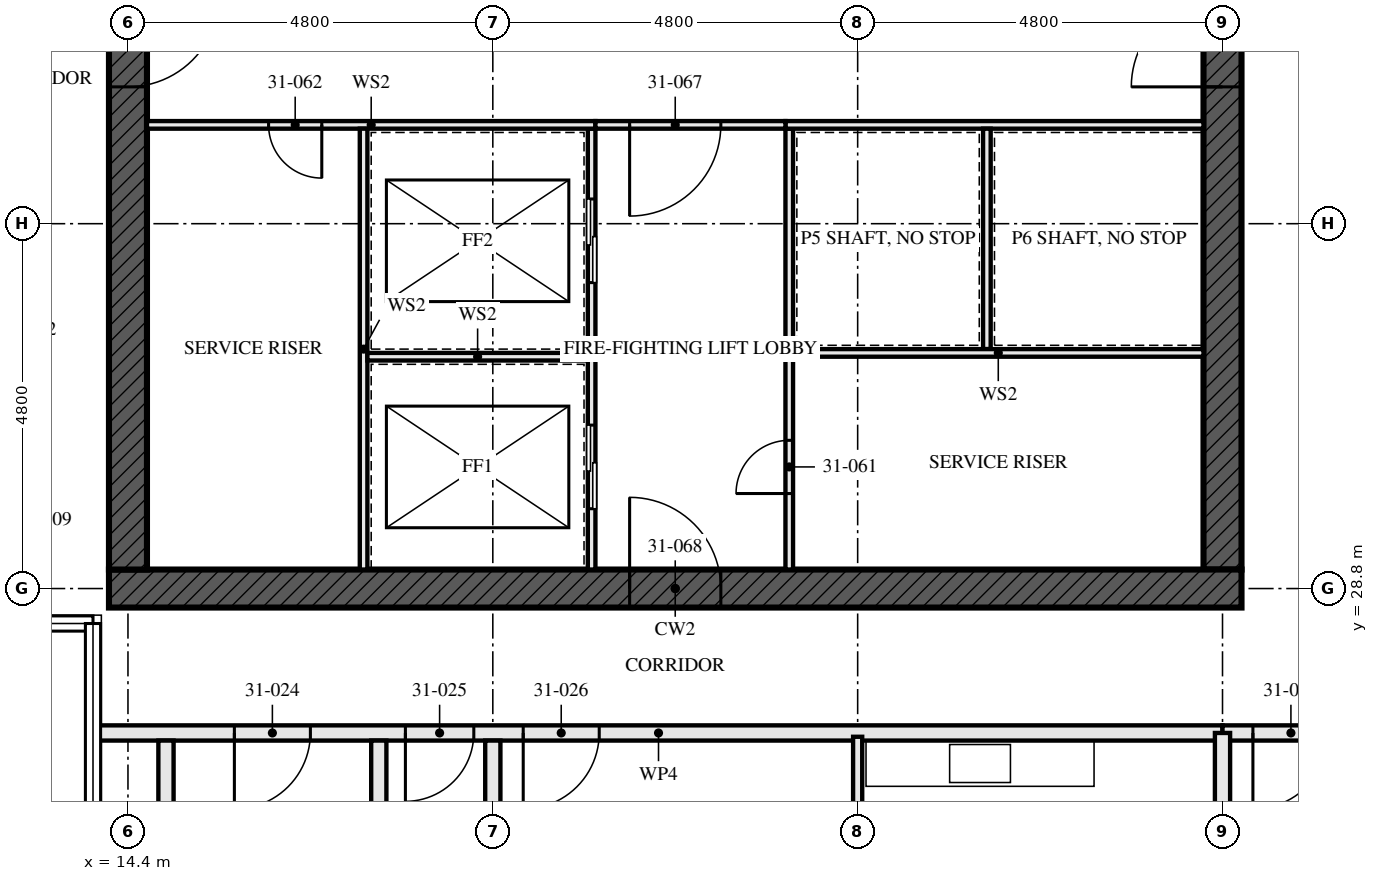
"""IFC4 building model, lengths in metres.
Left out: names, types, materials, properties, quantities, classifications, styles, units other than length and angle.
Written with IfcOpenShell. Run it as: python <this file> out.ifc"""

import sys

from ifc_helpers import new_model, si_unit, direction, frame, frame_2d, origin, place, context, subcontext, project, spatial, rectangle, extrude, element, fill, save


model = new_model("IFC4")
c1 = context("Model", 3, precision=1e-05, world=origin(), true_north=direction((0.0, 1.0)))
c2 = subcontext(c1, "Body", "Model", "MODEL_VIEW")
j1 = project(units=[si_unit("LENGTHUNIT", "METRE"), si_unit("PLANEANGLEUNIT", "RADIAN")], contexts=[c1])
p1 = place(None, origin())
s1 = spatial("IfcSite", under=j1, at=p1, CompositionType="ELEMENT")
p2 = place(p1, origin())
s2 = spatial("IfcBuilding", under=s1, at=p2, CompositionType="ELEMENT")
p3 = place(p2, frame((0.0, 0.0, 115.5)))
s3 = spatial("IfcBuildingStorey", under=s2, at=p3, CompositionType="ELEMENT", Elevation=115.5)
p4 = place(p3, frame((14.15, 28.8, -0.17), z_axis=(0.0, 0.0, 1.0), x_axis=(1.0, 0.0, 0.0)))
e1 = element("IfcWall", 1, at=p4, inside=s3, PredefinedType="SHEAR", context=c2, shape_type="SweptSolid", body=[
    extrude(rectangle(XDim=14.9, YDim=0.5, at=frame_2d((7.45, 0.0))), origin(), (0.0, 0.0, 1.0), 3.5),
])
p5 = place(p4, frame((6.85, 0.0, 0.17)))
e2 = element("IfcOpeningElement", 2, at=p5, cuts=e1, PredefinedType="OPENING", context=c2, shape_type="SweptSolid", body=[
    extrude(rectangle(XDim=1.2, YDim=2.1, at=frame_2d((0.6, 1.05))), frame((0.0, 0.26, 0.0), z_axis=(0.0, -1.0, 0.0), x_axis=(1.0, 0.0, 0.0)), (0.0, 0.0, 1.0), 0.521),
])
p6 = place(p3, frame((14.4, 42.95, -0.17), z_axis=(0.0, 0.0, 1.0), x_axis=(0.0, -1.0, 0.0)))
e3 = element("IfcWall", 3, at=p6, inside=s3, PredefinedType="SHEAR", context=c2, shape_type="SweptSolid", body=[
    extrude(rectangle(XDim=13.9, YDim=0.5, at=frame_2d((6.95, 0.0))), origin(), (0.0, 0.0, 1.0), 3.5),
])
p7 = place(p6, frame((6.35, 0.0, 0.17)))
e4 = element("IfcOpeningElement", 4, at=p7, cuts=e3, PredefinedType="OPENING", context=c2, shape_type="SweptSolid", body=[
    extrude(rectangle(XDim=1.2, YDim=2.1, at=frame_2d((0.6, 1.05))), frame((0.0, 0.26, 0.0), z_axis=(0.0, -1.0, 0.0), x_axis=(1.0, 0.0, 0.0)), (0.0, 0.0, 1.0), 0.521),
])
p8 = place(p3, frame((28.8, 29.05, -0.17), z_axis=(0.0, 0.0, 1.0), x_axis=(0.0, 1.0, 0.0)))
e5 = element("IfcWall", 5, at=p8, inside=s3, PredefinedType="SHEAR", context=c2, shape_type="SweptSolid", body=[
    extrude(rectangle(XDim=13.9, YDim=0.5, at=frame_2d((6.95, 0.0))), origin(), (0.0, 0.0, 1.0), 3.5),
])
p9 = place(p8, frame((6.35, 0.0, 0.17)))
e6 = element("IfcOpeningElement", 6, at=p9, cuts=e5, PredefinedType="OPENING", context=c2, shape_type="SweptSolid", body=[
    extrude(rectangle(XDim=1.2, YDim=2.1, at=frame_2d((0.6, 1.05))), frame((0.0, 0.26, 0.0), z_axis=(0.0, -1.0, 0.0), x_axis=(1.0, 0.0, 0.0)), (0.0, 0.0, 1.0), 0.521),
])
for number, where, z_axis, x_axis in (
    (7, (14.9, 22.1, 0.0), (0.0, 0.0, 1.0), (0.0, 1.0, 0.0)),
    (8, (17.7, 22.1, 0.0), (0.0, 0.0, 1.0), (0.0, 1.0, 0.0)),
):
    element("IfcWall", number, at=place(p3, frame(where, z_axis=z_axis, x_axis=x_axis)), inside=s3, PredefinedType="SOLIDWALL", context=c2, shape_type="SweptSolid", body=[
        extrude(rectangle(XDim=4.7, YDim=0.2, at=frame_2d((2.35, 0.0))), origin(), (0.0, 0.0, 1.0), 2.99),
    ])
p10 = place(p3, frame((19.2, 19.52, 0.0), z_axis=(0.0, 0.0, 1.0), x_axis=(0.0, 1.0, 0.0)))
e9 = element("IfcWall", 9, at=p10, inside=s3, PredefinedType="PARTITIONING", context=c2, shape_type="SweptSolid", body=[
    extrude(rectangle(XDim=7.28, YDim=0.2, at=frame_2d((3.64, 0.0))), origin(), (0.0, 0.0, 1.0), 2.55),
])
p11 = place(p3, frame((24.0, 18.6, 0.0), z_axis=(0.0, 0.0, 1.0), x_axis=(0.0, 1.0, 0.0)))
e10 = element("IfcWall", 10, at=p11, inside=s3, PredefinedType="PARTITIONING", context=c2, shape_type="SweptSolid", body=[
    extrude(rectangle(XDim=8.25, YDim=0.12, at=frame_2d((4.125, 0.0))), origin(), (0.0, 0.0, 1.0), 2.55),
])
p12 = place(p11, frame((5.15, 0.0, 0.0)))
e11 = element("IfcOpeningElement", 11, at=p12, cuts=e10, PredefinedType="OPENING", context=c2, shape_type="SweptSolid", body=[
    extrude(rectangle(XDim=0.9, YDim=2.1, at=frame_2d((0.45, 1.05))), frame((0.0, 0.071, 0.0), z_axis=(0.0, -1.0, 0.0), x_axis=(1.0, 0.0, 0.0)), (0.0, 0.0, 1.0), 0.141),
])
p13 = place(p3, frame((13.96, 26.9, 0.0), z_axis=(0.0, 0.0, 1.0), x_axis=(1.0, 0.0, 0.0)))
e12 = element("IfcWall", 12, at=p13, inside=s3, PredefinedType="PARTITIONING", context=c2, shape_type="SweptSolid", body=[
    extrude(rectangle(XDim=14.84, YDim=0.2, at=frame_2d((7.42, 0.0))), origin(), (0.0, 0.0, 1.0), 2.32),
])
p14 = place(p13, frame((1.84, 0.0, 0.0)))
e13 = element("IfcOpeningElement", 13, at=p14, cuts=e12, PredefinedType="OPENING", context=c2, shape_type="SweptSolid", body=[
    extrude(rectangle(XDim=1.0, YDim=2.1, at=frame_2d((0.5, 1.05))), frame((0.0, 0.111, 0.0), z_axis=(0.0, -1.0, 0.0), x_axis=(1.0, 0.0, 0.0)), (0.0, 0.0, 1.0), 0.221),
])
p15 = place(p13, frame((4.09, 0.0, 0.0)))
e14 = element("IfcOpeningElement", 14, at=p15, cuts=e12, PredefinedType="OPENING", context=c2, shape_type="SweptSolid", body=[
    extrude(rectangle(XDim=0.9, YDim=2.1, at=frame_2d((0.45, 1.05))), frame((0.0, 0.111, 0.0), z_axis=(0.0, -1.0, 0.0), x_axis=(1.0, 0.0, 0.0)), (0.0, 0.0, 1.0), 0.221),
])
p16 = place(p13, frame((5.64, 0.0, 0.0)))
e15 = element("IfcOpeningElement", 15, at=p16, cuts=e12, PredefinedType="OPENING", context=c2, shape_type="SweptSolid", body=[
    extrude(rectangle(XDim=1.0, YDim=2.1, at=frame_2d((0.5, 1.05))), frame((0.0, 0.111, 0.0), z_axis=(0.0, -1.0, 0.0), x_axis=(1.0, 0.0, 0.0)), (0.0, 0.0, 1.0), 0.221),
])
p17 = place(p3, frame((28.8, 26.9, 0.0), z_axis=(0.0, 0.0, 1.0), x_axis=(1.0, 0.0, 0.0)))
e16 = element("IfcWall", 16, at=p17, inside=s3, PredefinedType="PARTITIONING", context=c2, shape_type="SweptSolid", body=[
    extrude(rectangle(XDim=9.6, YDim=0.2, at=frame_2d((4.8, 0.0))), origin(), (0.0, 0.0, 1.0), 3.33),
])
p18 = place(p17, frame((0.4, 0.0, 0.0)))
e17 = element("IfcOpeningElement", 17, at=p18, cuts=e16, PredefinedType="OPENING", context=c2, shape_type="SweptSolid", body=[
    extrude(rectangle(XDim=1.0, YDim=2.1, at=frame_2d((0.5, 1.05))), frame((0.0, 0.111, 0.0), z_axis=(0.0, -1.0, 0.0), x_axis=(1.0, 0.0, 0.0)), (0.0, 0.0, 1.0), 0.221),
])
p19 = place(p17, frame((5.2, 0.0, 0.0)))
e18 = element("IfcOpeningElement", 18, at=p19, cuts=e16, PredefinedType="OPENING", context=c2, shape_type="SweptSolid", body=[
    extrude(rectangle(XDim=1.0, YDim=2.1, at=frame_2d((0.5, 1.05))), frame((0.0, 0.111, 0.0), z_axis=(0.0, -1.0, 0.0), x_axis=(1.0, 0.0, 0.0)), (0.0, 0.0, 1.0), 0.221),
])
p20 = place(p3, frame((20.5, 29.05, 0.0), z_axis=(0.0, 0.0, 1.0), x_axis=(0.0, 1.0, 0.0)))
e19 = element("IfcWall", 19, at=p20, inside=s3, PredefinedType="SOLIDWALL", context=c2, shape_type="SweptSolid", body=[
    extrude(rectangle(XDim=5.8, YDim=0.1, at=frame_2d((2.9, 0.0))), origin(), (0.0, 0.0, 1.0), 3.33),
])
p21 = place(p20, frame((0.8, 0.0, 0.0)))
e20 = element("IfcOpeningElement", 20, at=p21, cuts=e19, PredefinedType="OPENING", context=c2, shape_type="SweptSolid", body=[
    extrude(rectangle(XDim=1.1, YDim=2.3, at=frame_2d((0.55, 1.15))), frame((0.0, 0.061, 0.0), z_axis=(0.0, -1.0, 0.0), x_axis=(1.0, 0.0, 0.0)), (0.0, 0.0, 1.0), 0.121),
])
p22 = place(p20, frame((3.775, 0.0, 0.0)))
e21 = element("IfcOpeningElement", 21, at=p22, cuts=e19, PredefinedType="OPENING", context=c2, shape_type="SweptSolid", body=[
    extrude(rectangle(XDim=1.1, YDim=2.3, at=frame_2d((0.55, 1.15))), frame((0.0, 0.061, 0.0), z_axis=(0.0, -1.0, 0.0), x_axis=(1.0, 0.0, 0.0)), (0.0, 0.0, 1.0), 0.121),
])
p23 = place(p3, frame((23.1, 29.05, 0.0), z_axis=(0.0, 0.0, 1.0), x_axis=(0.0, 1.0, 0.0)))
e22 = element("IfcWall", 22, at=p23, inside=s3, PredefinedType="SOLIDWALL", context=c2, shape_type="SweptSolid", body=[
    extrude(rectangle(XDim=5.8, YDim=0.1, at=frame_2d((2.9, 0.0))), origin(), (0.0, 0.0, 1.0), 3.33),
])
p24 = place(p23, frame((1.0, 0.0, 0.0)))
e23 = element("IfcOpeningElement", 23, at=p24, cuts=e22, PredefinedType="OPENING", context=c2, shape_type="SweptSolid", body=[
    extrude(rectangle(XDim=0.7, YDim=2.1, at=frame_2d((0.35, 1.05))), frame((0.0, 0.061, 0.0), z_axis=(0.0, -1.0, 0.0), x_axis=(1.0, 0.0, 0.0)), (0.0, 0.0, 1.0), 0.121),
])
p25 = place(p3, frame((14.65, 34.9, 0.0), z_axis=(0.0, 0.0, 1.0), x_axis=(1.0, 0.0, 0.0)))
e24 = element("IfcWall", 24, at=p25, inside=s3, PredefinedType="SOLIDWALL", context=c2, shape_type="SweptSolid", body=[
    extrude(rectangle(XDim=5.9, YDim=0.1, at=frame_2d((2.95, 0.0))), origin(), (0.0, 0.0, 1.0), 3.33),
])
p26 = place(p25, frame((1.6, 0.0, 0.0)))
e25 = element("IfcOpeningElement", 25, at=p26, cuts=e24, PredefinedType="OPENING", context=c2, shape_type="SweptSolid", body=[
    extrude(rectangle(XDim=0.7, YDim=2.1, at=frame_2d((0.35, 1.05))), frame((0.0, 0.061, 0.0), z_axis=(0.0, -1.0, 0.0), x_axis=(1.0, 0.0, 0.0)), (0.0, 0.0, 1.0), 0.121),
])
p27 = place(p3, frame((23.05, 34.9, 0.0), z_axis=(0.0, 0.0, 1.0), x_axis=(1.0, 0.0, 0.0)))
e26 = element("IfcWall", 26, at=p27, inside=s3, PredefinedType="SOLIDWALL", context=c2, shape_type="SweptSolid", body=[
    extrude(rectangle(XDim=5.5, YDim=0.1, at=frame_2d((2.75, 0.0))), origin(), (0.0, 0.0, 1.0), 3.33),
])
p28 = place(p3, frame((20.55, 34.9, 0.0), z_axis=(0.0, 0.0, 1.0), x_axis=(1.0, 0.0, 0.0)))
e27 = element("IfcWall", 27, at=p28, inside=s3, PredefinedType="SOLIDWALL", context=c2, shape_type="SweptSolid", body=[
    extrude(rectangle(XDim=2.5, YDim=0.1, at=frame_2d((1.25, 0.0))), origin(), (0.0, 0.0, 1.0), 3.33),
])
p29 = place(p28, frame((0.45, 0.0, 0.0)))
e28 = element("IfcOpeningElement", 28, at=p29, cuts=e27, PredefinedType="OPENING", context=c2, shape_type="SweptSolid", body=[
    extrude(rectangle(XDim=1.2, YDim=2.1, at=frame_2d((0.6, 1.05))), frame((0.0, 0.061, 0.0), z_axis=(0.0, -1.0, 0.0), x_axis=(1.0, 0.0, 0.0)), (0.0, 0.0, 1.0), 0.121),
])
p30 = place(p3, frame((17.5, 29.05, 0.0), z_axis=(0.0, 0.0, 1.0), x_axis=(0.0, 1.0, 0.0)))
e29 = element("IfcWall", 29, at=p30, inside=s3, PredefinedType="SOLIDWALL", context=c2, shape_type="SweptSolid", body=[
    extrude(rectangle(XDim=5.8, YDim=0.1, at=frame_2d((2.9, 0.0))), origin(), (0.0, 0.0, 1.0), 3.33),
])
p31 = place(p3, frame((17.55, 31.85, 0.0), z_axis=(0.0, 0.0, 1.0), x_axis=(1.0, 0.0, 0.0)))
e30 = element("IfcWall", 30, at=p31, inside=s3, PredefinedType="SOLIDWALL", context=c2, shape_type="SweptSolid", body=[
    extrude(rectangle(XDim=2.9, YDim=0.1, at=frame_2d((1.45, 0.0))), origin(), (0.0, 0.0, 1.0), 3.33),
])
p32 = place(p3, frame((25.7, 31.95, 0.0), z_axis=(0.0, 0.0, 1.0), x_axis=(0.0, 1.0, 0.0)))
e31 = element("IfcWall", 31, at=p32, inside=s3, PredefinedType="SOLIDWALL", context=c2, shape_type="SweptSolid", body=[
    extrude(rectangle(XDim=2.9, YDim=0.1, at=frame_2d((1.45, 0.0))), origin(), (0.0, 0.0, 1.0), 3.33),
])
p33 = place(p3, frame((23.15, 31.9, 0.0), z_axis=(0.0, 0.0, 1.0), x_axis=(1.0, 0.0, 0.0)))
e32 = element("IfcWall", 32, at=p33, inside=s3, PredefinedType="SOLIDWALL", context=c2, shape_type="SweptSolid", body=[
    extrude(rectangle(XDim=5.4, YDim=0.1, at=frame_2d((2.7, 0.0))), origin(), (0.0, 0.0, 1.0), 3.33),
])
p34 = place(p3, frame((28.8, 24.304, 0.0), z_axis=(0.0, 0.0, 1.0), x_axis=(0.0, 1.0, 0.0)))
e33 = element("IfcWall", 33, at=p34, inside=s3, PredefinedType="PARTITIONING", context=c2, shape_type="SweptSolid", body=[
    extrude(rectangle(XDim=2.595, YDim=0.2, at=frame_2d((1.298, 0.0))), origin(), (0.0, 0.0, 1.0), 2.32),
])
p35 = place(p14, frame((1.0, 0.0, 0.0), z_axis=(0.0, 0.0, 1.0), x_axis=(-1.0, 0.0, 0.0)))
e34 = element("IfcDoor", 34, at=p35, inside=s3, OperationType="SINGLE_SWING_LEFT", PredefinedType="DOOR", context=c2, shape_type="SweptSolid", body=[
    extrude(rectangle(XDim=1.0, YDim=2.1, at=frame_2d((0.5, 1.05))), frame((0.0, 0.032, 0.0), z_axis=(0.0, -1.0, 0.0), x_axis=(1.0, 0.0, 0.0)), (0.0, 0.0, 1.0), 0.064),
])
fill(e13, e34)
p36 = place(p15, frame((0.9, 0.0, 0.0), z_axis=(0.0, 0.0, 1.0), x_axis=(-1.0, 0.0, 0.0)))
e35 = element("IfcDoor", 35, at=p36, inside=s3, OperationType="SINGLE_SWING_LEFT", PredefinedType="DOOR", context=c2, shape_type="SweptSolid", body=[
    extrude(rectangle(XDim=0.9, YDim=2.1, at=frame_2d((0.45, 1.05))), frame((0.0, 0.027, 0.0), z_axis=(0.0, -1.0, 0.0), x_axis=(1.0, 0.0, 0.0)), (0.0, 0.0, 1.0), 0.054),
])
fill(e14, e35)
p37 = place(p16, frame((1.0, 0.0, 0.0), z_axis=(0.0, 0.0, 1.0), x_axis=(-1.0, 0.0, 0.0)))
e36 = element("IfcDoor", 36, at=p37, inside=s3, OperationType="SINGLE_SWING_LEFT", PredefinedType="DOOR", context=c2, shape_type="SweptSolid", body=[
    extrude(rectangle(XDim=1.0, YDim=2.1, at=frame_2d((0.5, 1.05))), frame((0.0, 0.027, 0.0), z_axis=(0.0, -1.0, 0.0), x_axis=(1.0, 0.0, 0.0)), (0.0, 0.0, 1.0), 0.054),
])
fill(e15, e36)
p38 = place(p18, frame((1.0, 0.0, 0.0), z_axis=(0.0, 0.0, 1.0), x_axis=(-1.0, 0.0, 0.0)))
e37 = element("IfcDoor", 37, at=p38, inside=s3, OperationType="SINGLE_SWING_LEFT", PredefinedType="DOOR", context=c2, shape_type="SweptSolid", body=[
    extrude(rectangle(XDim=1.0, YDim=2.1, at=frame_2d((0.5, 1.05))), frame((0.0, 0.027, 0.0), z_axis=(0.0, -1.0, 0.0), x_axis=(1.0, 0.0, 0.0)), (0.0, 0.0, 1.0), 0.054),
])
fill(e17, e37)
p39 = place(p21, origin())
e38 = element("IfcDoor", 38, at=p39, inside=s3, OperationType="SLIDING_TO_LEFT", PredefinedType="DOOR", context=c2, shape_type="SweptSolid", body=[
    extrude(rectangle(XDim=1.1, YDim=2.3, at=frame_2d((0.55, 1.15))), frame((0.0, 0.05, 0.0), z_axis=(0.0, -1.0, 0.0), x_axis=(1.0, 0.0, 0.0)), (0.0, 0.0, 1.0), 0.1),
])
fill(e20, e38)
p40 = place(p22, origin())
e39 = element("IfcDoor", 39, at=p40, inside=s3, OperationType="SLIDING_TO_LEFT", PredefinedType="DOOR", context=c2, shape_type="SweptSolid", body=[
    extrude(rectangle(XDim=1.1, YDim=2.3, at=frame_2d((0.55, 1.15))), frame((0.0, 0.05, 0.0), z_axis=(0.0, -1.0, 0.0), x_axis=(1.0, 0.0, 0.0)), (0.0, 0.0, 1.0), 0.1),
])
fill(e21, e39)
p41 = place(p24, origin())
e40 = element("IfcDoor", 40, at=p41, inside=s3, OperationType="SINGLE_SWING_RIGHT", PredefinedType="DOOR", context=c2, shape_type="SweptSolid", body=[
    extrude(rectangle(XDim=0.7, YDim=2.1, at=frame_2d((0.35, 1.05))), frame((0.0, 0.027, 0.0), z_axis=(0.0, -1.0, 0.0), x_axis=(1.0, 0.0, 0.0)), (0.0, 0.0, 1.0), 0.054),
])
fill(e23, e40)
p42 = place(p26, frame((0.7, 0.0, 0.0), z_axis=(0.0, 0.0, 1.0), x_axis=(-1.0, 0.0, 0.0)))
e41 = element("IfcDoor", 41, at=p42, inside=s3, OperationType="SINGLE_SWING_RIGHT", PredefinedType="DOOR", context=c2, shape_type="SweptSolid", body=[
    extrude(rectangle(XDim=0.7, YDim=2.1, at=frame_2d((0.35, 1.05))), frame((0.0, 0.027, 0.0), z_axis=(0.0, -1.0, 0.0), x_axis=(1.0, 0.0, 0.0)), (0.0, 0.0, 1.0), 0.054),
])
fill(e25, e41)
p43 = place(p29, frame((1.2, 0.0, 0.0), z_axis=(0.0, 0.0, 1.0), x_axis=(-1.0, 0.0, 0.0)))
e42 = element("IfcDoor", 42, at=p43, inside=s3, OperationType="SINGLE_SWING_LEFT", PredefinedType="DOOR", context=c2, shape_type="SweptSolid", body=[
    extrude(rectangle(XDim=1.2, YDim=2.1, at=frame_2d((0.6, 1.05))), frame((0.0, 0.027, 0.0), z_axis=(0.0, -1.0, 0.0), x_axis=(1.0, 0.0, 0.0)), (0.0, 0.0, 1.0), 0.054),
])
fill(e28, e42)
p44 = place(p5, origin())
e43 = element("IfcDoor", 43, at=p44, inside=s3, OperationType="SINGLE_SWING_LEFT", PredefinedType="DOOR", context=c2, shape_type="SweptSolid", body=[
    extrude(rectangle(XDim=1.2, YDim=2.1, at=frame_2d((0.6, 1.05))), frame((0.0, 0.027, 0.0), z_axis=(0.0, -1.0, 0.0), x_axis=(1.0, 0.0, 0.0)), (0.0, 0.0, 1.0), 0.054),
])
fill(e2, e43)
p45 = place(p7, origin())
e44 = element("IfcDoor", 44, at=p45, inside=s3, OperationType="SINGLE_SWING_LEFT", PredefinedType="DOOR", context=c2, shape_type="SweptSolid", body=[
    extrude(rectangle(XDim=1.2, YDim=2.1, at=frame_2d((0.6, 1.05))), frame((0.0, 0.027, 0.0), z_axis=(0.0, -1.0, 0.0), x_axis=(1.0, 0.0, 0.0)), (0.0, 0.0, 1.0), 0.054),
])
fill(e4, e44)
p46 = place(p9, origin())
e45 = element("IfcDoor", 45, at=p46, inside=s3, OperationType="SINGLE_SWING_LEFT", PredefinedType="DOOR", context=c2, shape_type="SweptSolid", body=[
    extrude(rectangle(XDim=1.2, YDim=2.1, at=frame_2d((0.6, 1.05))), frame((0.0, 0.027, 0.0), z_axis=(0.0, -1.0, 0.0), x_axis=(1.0, 0.0, 0.0)), (0.0, 0.0, 1.0), 0.054),
])
fill(e6, e45)
save(model, sys.argv[1])
